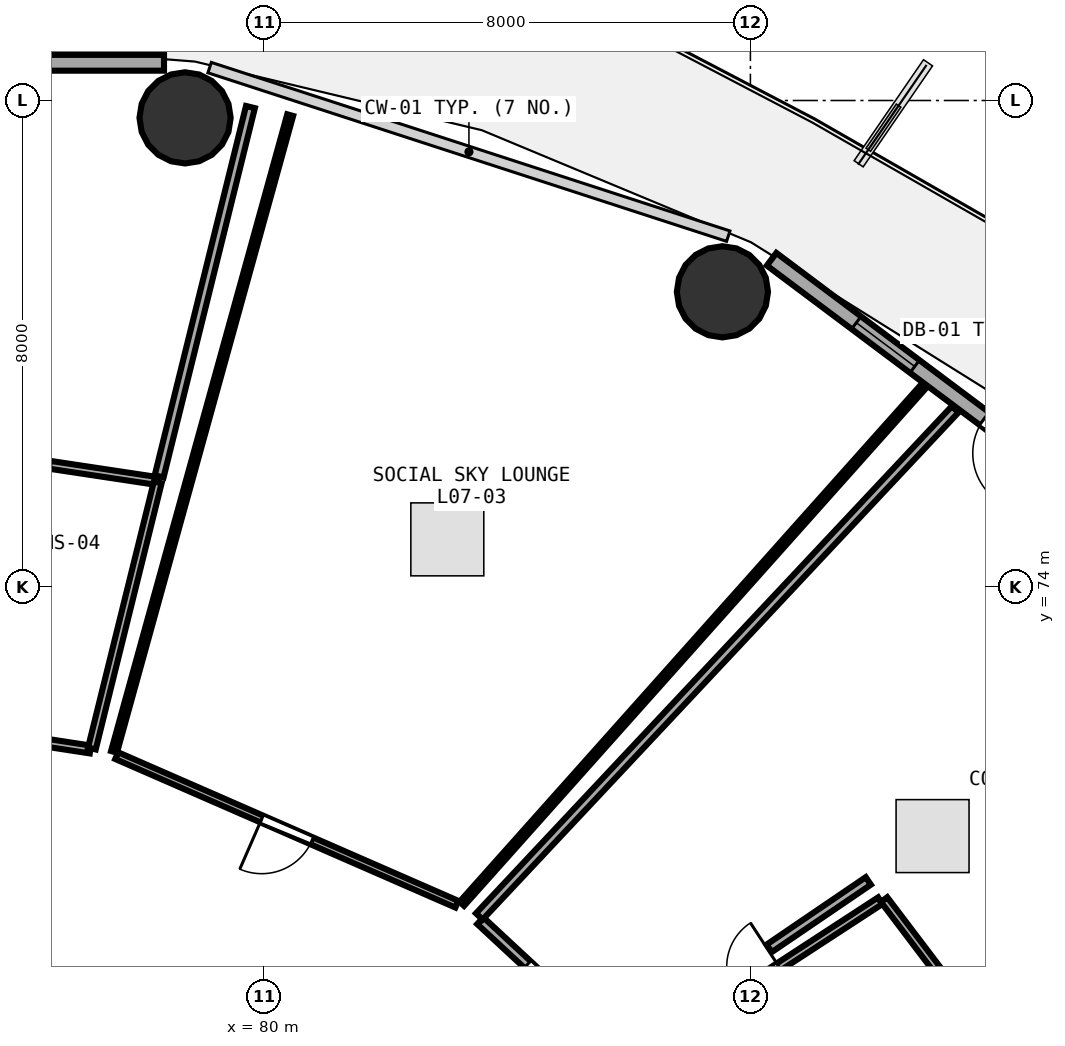
"""IFC4 building model, lengths in metres.
Left out: names, types, materials, properties, quantities, classifications, styles, units other than length and angle.
Written with IfcOpenShell. Run it as: python <this file> out.ifc"""

import sys

from ifc_helpers import new_model, si_unit, direction, frame, frame_2d, origin, origin_2d, place, context, subcontext, project, spatial, rectangle, circle, extrude, element, fill, save


model = new_model("IFC4")
c1 = context("Model", 3, precision=1e-05, world=origin(), true_north=direction((0.0, 1.0)))
c2 = subcontext(c1, "Body", "Model", "MODEL_VIEW")
j1 = project(units=[si_unit("LENGTHUNIT", "METRE"), si_unit("PLANEANGLEUNIT", "RADIAN")], contexts=[c1])
p1 = place(None, origin())
s1 = spatial("IfcSite", under=j1, at=p1, CompositionType="ELEMENT")
p2 = place(p1, origin())
s2 = spatial("IfcBuilding", under=s1, at=p2, CompositionType="ELEMENT")
p3 = place(p2, frame((0.0, 0.0, 30.0)))
s3 = spatial("IfcBuildingStorey", under=s2, at=p3, CompositionType="ELEMENT", Elevation=30.0)
for number, where, z_axis, x_axis in (
    (1, (87.54, 78.854, 0.0), (0.0, 0.0, 1.0), (1.0, 0.0, 0.0)),
    (2, (78.702, 81.714, 0.0), (0.0, 0.0, 1.0), (1.0, 0.0, 0.0)),
):
    element("IfcColumn", number, at=place(p3, frame(where, z_axis=z_axis, x_axis=x_axis)), inside=s3, PredefinedType="COLUMN", context=c2, shape_type="SweptSolid", body=[
        extrude(circle(Radius=0.75, at=origin_2d()), origin(), (0.0, 0.0, 1.0), 3.75),
    ])
p4 = place(p3, frame((94.984, 74.418, 0.0), z_axis=(0.0, 0.0, 1.0), x_axis=(-0.80030733173, 0.599590005569, 0.0)))
e3 = element("IfcWall", 3, at=p4, inside=s3, PredefinedType="SOLIDWALL", context=c2, shape_type="SweptSolid", body=[
    extrude(rectangle(XDim=8.291, YDim=0.26, at=frame_2d((4.145, 0.0))), origin(), (0.0, 0.0, 1.0), 3.475),
])
p5 = place(p4, frame((2.97, 0.0, 0.0)))
e4 = element("IfcOpeningElement", 4, at=p5, cuts=e3, PredefinedType="OPENING", context=c2, shape_type="SweptSolid", body=[
    extrude(rectangle(XDim=0.95, YDim=2.1, at=frame_2d((0.475, 1.05))), frame((0.0, 0.14, 0.0), z_axis=(0.0, -1.0, 0.0), x_axis=(1.0, 0.0, 0.0)), (0.0, 0.0, 1.0), 0.28),
])
p6 = place(p4, frame((5.35, 0.0, 0.85)))
e5 = element("IfcOpeningElement", 5, at=p6, cuts=e3, PredefinedType="OPENING", context=c2, shape_type="SweptSolid", body=[
    extrude(rectangle(XDim=1.2, YDim=1.45, at=frame_2d((0.6, 0.725))), frame((0.0, 0.14, 0.0), z_axis=(0.0, -1.0, 0.0), x_axis=(1.0, 0.0, 0.0)), (0.0, 0.0, 1.0), 0.28),
])
p7 = place(p3, frame((78.356, 82.62, 0.0), z_axis=(0.0, 0.0, 1.0), x_axis=(-1.0, 0.0, 0.0)))
e6 = element("IfcWall", 6, at=p7, inside=s3, PredefinedType="SOLIDWALL", context=c2, shape_type="SweptSolid", body=[
    extrude(rectangle(XDim=8.712, YDim=0.26, at=frame_2d((4.356, 0.0))), origin(), (0.0, 0.0, 1.0), 3.475),
])
p8 = place(p7, frame((3.556, 0.0, 0.85)))
e7 = element("IfcOpeningElement", 7, at=p8, cuts=e6, PredefinedType="OPENING", context=c2, shape_type="SweptSolid", body=[
    extrude(rectangle(XDim=1.6, YDim=1.45, at=frame_2d((0.8, 0.725))), frame((0.0, 0.14, 0.0), z_axis=(0.0, -1.0, 0.0), x_axis=(1.0, 0.0, 0.0)), (0.0, 0.0, 1.0), 0.28),
])
p9 = place(p3, frame((86.083, 66.2, 0.0), z_axis=(0.0, 0.0, 1.0), x_axis=(0.837796261941, 0.545982988267, 0.0)))
e8 = element("IfcWall", 8, at=p9, inside=s3, PredefinedType="PLUMBINGWALL", context=c2, shape_type="SweptSolid", body=[
    extrude(rectangle(XDim=4.838, YDim=0.13, at=frame_2d((2.419, 0.0))), origin(), (0.0, 0.0, 1.0), 3.235),
])
p10 = place(p9, frame((1.989, 0.0, 0.0)))
e9 = element("IfcOpeningElement", 9, at=p10, cuts=e8, PredefinedType="OPENING", context=c2, shape_type="SweptSolid", body=[
    extrude(rectangle(XDim=0.86, YDim=2.05, at=frame_2d((0.43, 1.025))), frame((0.0, 0.075, 0.0), z_axis=(0.0, -1.0, 0.0), x_axis=(1.0, 0.0, 0.0)), (0.0, 0.0, 1.0), 0.15),
])
p11 = place(p3, frame((85.806, 66.425, 0.0), z_axis=(0.0, 0.0, 1.0), x_axis=(-0.7329267348, 0.680307578538, 0.0)))
e10 = element("IfcWall", 10, at=p11, inside=s3, PredefinedType="PARTITIONING", context=c2, shape_type="SweptSolid", body=[
    extrude(rectangle(XDim=3.067, YDim=0.15, at=frame_2d((1.533, 0.0))), origin(), (0.0, 0.0, 1.0), 2.875),
])
p12 = place(p11, frame((1.059, 0.0, 0.0)))
e11 = element("IfcOpeningElement", 11, at=p12, cuts=e10, PredefinedType="OPENING", context=c2, shape_type="SweptSolid", body=[
    extrude(rectangle(XDim=0.95, YDim=2.08, at=frame_2d((0.475, 1.04))), frame((0.0, 0.085, 0.0), z_axis=(0.0, -1.0, 0.0), x_axis=(1.0, 0.0, 0.0)), (0.0, 0.0, 1.0), 0.17),
])
p13 = place(p3, frame((83.172, 68.783, 0.0), z_axis=(0.0, 0.0, 1.0), x_axis=(-0.916419655578, 0.400218708797, 0.0)))
e12 = element("IfcWall", 12, at=p13, inside=s3, PredefinedType="PARTITIONING", context=c2, shape_type="SweptSolid", body=[
    extrude(rectangle(XDim=6.104, YDim=0.12, at=frame_2d((3.052, 0.0))), origin(), (0.0, 0.0, 1.0), 2.875),
])
p14 = place(p13, frame((2.602, 0.0, 0.0)))
e13 = element("IfcOpeningElement", 13, at=p14, cuts=e12, PredefinedType="OPENING", context=c2, shape_type="SweptSolid", body=[
    extrude(rectangle(XDim=0.9, YDim=2.08, at=frame_2d((0.45, 1.04))), frame((0.0, 0.07, 0.0), z_axis=(0.0, -1.0, 0.0), x_axis=(1.0, 0.0, 0.0)), (0.0, 0.0, 1.0), 0.14),
])
p15 = place(p3, frame((87.657, 63.778, 0.0), z_axis=(0.0, 0.0, 1.0), x_axis=(0.926333713065, 0.376703931542, 0.0)))
e14 = element("IfcWall", 14, at=p15, inside=s3, PredefinedType="PARTITIONING", context=c2, shape_type="SweptSolid", body=[
    extrude(rectangle(XDim=12.099, YDim=0.15, at=frame_2d((6.05, 0.0))), origin(), (0.0, 0.0, 1.0), 2.875),
])
p16 = place(p3, frame((90.199, 68.858, 0.0), z_axis=(0.0, 0.0, 1.0), x_axis=(0.60376191721, -0.797164692725, 0.0)))
e15 = element("IfcWall", 15, at=p16, inside=s3, PredefinedType="PLUMBINGWALL", context=c2, shape_type="SweptSolid", body=[
    extrude(rectangle(XDim=1.669, YDim=0.13, at=frame_2d((0.834, 0.0))), origin(), (0.0, 0.0, 1.0), 3.175),
])
p17 = place(p3, frame((83.542, 68.581, 0.0), z_axis=(0.0, 0.0, 1.0), x_axis=(0.684261294523, 0.729236916796, 0.0)))
e16 = element("IfcWall", 16, at=p17, inside=s3, PredefinedType="PARTITIONING", context=c2, shape_type="SweptSolid", body=[
    extrude(rectangle(XDim=11.438, YDim=0.15, at=frame_2d((5.719, 0.0))), origin(), (0.0, 0.0, 1.0), 2.875),
])
p18 = place(p3, frame((89.939, 69.166, 0.0), z_axis=(0.0, 0.0, 1.0), x_axis=(-0.826811291248, -0.562479411769, 0.0)))
e17 = element("IfcWall", 17, at=p18, inside=s3, PredefinedType="PARTITIONING", context=c2, shape_type="SweptSolid", body=[
    extrude(rectangle(XDim=1.971, YDim=0.15, at=frame_2d((0.985, 0.0))), origin(), (0.0, 0.0, 1.0), 3.48),
])
p19 = place(p3, frame((77.534, 71.289, 0.0), z_axis=(0.0, 0.0, 1.0), x_axis=(0.26671307518, 0.963775977875, 0.0)))
e18 = element("IfcWall", 18, at=p19, inside=s3, PredefinedType="PARTITIONING", context=c2, shape_type="SweptSolid", body=[
    extrude(rectangle(XDim=10.865, YDim=0.1, at=frame_2d((5.432, 0.0))), origin(), (0.0, 0.0, 1.0), 2.875),
])
p20 = place(p3, frame((90.844, 77.294, 0.0), z_axis=(0.0, 0.0, 1.0), x_axis=(-0.66580890104, -0.746122313897, 0.0)))
e19 = element("IfcWall", 19, at=p20, inside=s3, PredefinedType="PARTITIONING", context=c2, shape_type="SweptSolid", body=[
    extrude(rectangle(XDim=11.399, YDim=0.1, at=frame_2d((5.7, 0.0))), origin(), (0.0, 0.0, 1.0), 2.875),
])
p21 = place(p3, frame((77.145, 71.327, 0.0), z_axis=(0.0, 0.0, 1.0), x_axis=(-0.988427236939, 0.151695739152, 0.0)))
e20 = element("IfcWall", 20, at=p21, inside=s3, PredefinedType="PLUMBINGWALL", context=c2, shape_type="SweptSolid", body=[
    extrude(rectangle(XDim=1.32, YDim=0.13, at=frame_2d((0.66, 0.0))), origin(), (0.0, 0.0, 1.0), 3.235),
])
p22 = place(p3, frame((76.469, 76.01, 0.0), z_axis=(0.0, 0.0, 1.0), x_axis=(0.988799846431, -0.14924765894, 0.0)))
e21 = element("IfcWall", 21, at=p22, inside=s3, PredefinedType="PLUMBINGWALL", context=c2, shape_type="SweptSolid", body=[
    extrude(rectangle(XDim=1.79, YDim=0.13, at=frame_2d((0.895, 0.0))), origin(), (0.0, 0.0, 1.0), 3.48),
])
p23 = place(p3, frame((78.253, 75.721, 0.0), z_axis=(0.0, 0.0, 1.0), x_axis=(-0.240229117536, -0.970716215528, 0.0)))
e22 = element("IfcWall", 22, at=p23, inside=s3, PredefinedType="PLUMBINGWALL", context=c2, shape_type="SweptSolid", body=[
    extrude(rectangle(XDim=4.509, YDim=0.13, at=frame_2d((2.255, 0.0))), origin(), (0.0, 0.0, 1.0), 3.175),
])
p24 = place(p3, frame((79.777, 81.892, 0.0), z_axis=(0.0, 0.0, 1.0), x_axis=(-0.240000910349, -0.970772662899, 0.0)))
e23 = element("IfcWall", 23, at=p24, inside=s3, PredefinedType="PARTITIONING", context=c2, shape_type="SweptSolid", body=[
    extrude(rectangle(XDim=6.257, YDim=0.15, at=frame_2d((3.128, 0.0))), origin(), (0.0, 0.0, 1.0), 2.875),
])
p25 = place(p5, frame((0.95, 0.0, 0.0), z_axis=(0.0, 0.0, 1.0), x_axis=(-1.0, 0.0, 0.0)))
e24 = element("IfcDoor", 24, at=p25, inside=s3, OperationType="SINGLE_SWING_RIGHT", PredefinedType="DOOR", context=c2, shape_type="SweptSolid", body=[
    extrude(rectangle(XDim=0.95, YDim=2.1, at=frame_2d((0.475, 1.05))), frame((0.0, 0.025, 0.0), z_axis=(0.0, -1.0, 0.0), x_axis=(1.0, 0.0, 0.0)), (0.0, 0.0, 1.0), 0.05),
])
fill(e4, e24)
p26 = place(p6, origin())
e25 = element("IfcWindow", 25, at=p26, inside=s3, PartitioningType="SINGLE_PANEL", PredefinedType="WINDOW", context=c2, shape_type="SweptSolid", body=[
    extrude(rectangle(XDim=1.2, YDim=1.45, at=frame_2d((0.6, 0.725))), frame((0.0, 0.03, 0.0), z_axis=(0.0, -1.0, 0.0), x_axis=(1.0, 0.0, 0.0)), (0.0, 0.0, 1.0), 0.06),
])
fill(e5, e25)
p27 = place(p10, origin())
e26 = element("IfcDoor", 26, at=p27, inside=s3, OperationType="SINGLE_SWING_RIGHT", PredefinedType="DOOR", context=c2, shape_type="SweptSolid", body=[
    extrude(rectangle(XDim=0.86, YDim=2.05, at=frame_2d((0.43, 1.025))), frame((0.0, 0.025, 0.0), z_axis=(0.0, -1.0, 0.0), x_axis=(1.0, 0.0, 0.0)), (0.0, 0.0, 1.0), 0.05),
])
fill(e9, e26)
p28 = place(p12, origin())
e27 = element("IfcDoor", 27, at=p28, inside=s3, OperationType="SINGLE_SWING_LEFT", PredefinedType="DOOR", context=c2, shape_type="SweptSolid", body=[
    extrude(rectangle(XDim=0.95, YDim=2.08, at=frame_2d((0.475, 1.04))), frame((0.0, 0.025, 0.0), z_axis=(0.0, -1.0, 0.0), x_axis=(1.0, 0.0, 0.0)), (0.0, 0.0, 1.0), 0.05),
])
fill(e11, e27)
p29 = place(p14, origin())
e28 = element("IfcDoor", 28, at=p29, inside=s3, OperationType="SINGLE_SWING_RIGHT", PredefinedType="DOOR", context=c2, shape_type="SweptSolid", body=[
    extrude(rectangle(XDim=0.9, YDim=2.08, at=frame_2d((0.45, 1.04))), frame((0.0, 0.025, 0.0), z_axis=(0.0, -1.0, 0.0), x_axis=(1.0, 0.0, 0.0)), (0.0, 0.0, 1.0), 0.05),
])
fill(e13, e28)
save(model, sys.argv[1])
